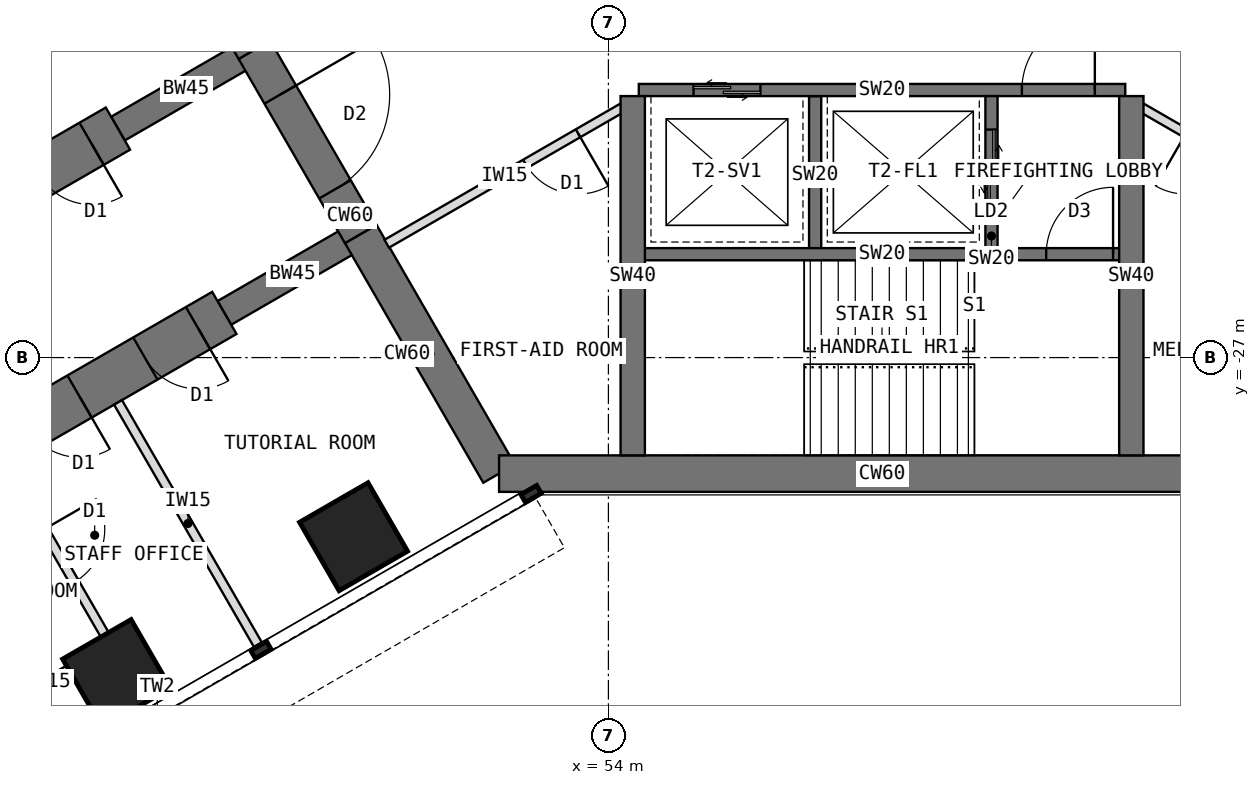
"""IFC4 building model, lengths in metres.
Left out: names, types, materials, properties, quantities, classifications, styles, units other than length and angle.
Written with IfcOpenShell. Run it as: python <this file> out.ifc"""

import sys

from ifc_helpers import new_model, si_unit, direction, frame, frame_2d, origin, origin_2d, place, context, subcontext, project, spatial, rectangle, extrude, element, fill, save


model = new_model("IFC4")
c1 = context("Model", 3, precision=1e-05, world=origin(), true_north=direction((0.0, 1.0)))
c2 = subcontext(c1, "Body", "Model", "MODEL_VIEW")
j1 = project(units=[si_unit("LENGTHUNIT", "METRE"), si_unit("PLANEANGLEUNIT", "RADIAN")], contexts=[c1])
p1 = place(None, origin())
s1 = spatial("IfcSite", under=j1, at=p1, CompositionType="ELEMENT")
p2 = place(p1, origin())
s2 = spatial("IfcBuilding", under=s1, at=p2, CompositionType="ELEMENT")
p3 = place(p2, frame((0.0, 0.0, 133.5)))
s3 = spatial("IfcBuildingStorey", under=s2, at=p3, CompositionType="ELEMENT", Elevation=133.5)
p4 = place(p3, frame((45.904, -18.0, 0.0), z_axis=(0.0, 0.0, 1.0), x_axis=(0.500024481964, -0.866011268655, 0.0)))
e1 = element("IfcWall", 1, at=p4, inside=s3, PredefinedType="SHEAR", context=c2, shape_type="SweptSolid", body=[
    extrude(rectangle(XDim=4.548, YDim=0.6, at=frame_2d((2.274, 0.0))), origin(), (0.0, 0.0, 1.0), 4.0),
])
p5 = place(p3, frame((48.178, -21.939, 0.0), z_axis=(0.0, 0.0, 1.0), x_axis=(0.500010275428, -0.866019471182, 0.0)))
e2 = element("IfcWall", 2, at=p5, inside=s3, PredefinedType="SHEAR", context=c2, shape_type="SweptSolid", body=[
    extrude(rectangle(XDim=3.5, YDim=0.6, at=frame_2d((1.75, 0.0))), origin(), (0.0, 0.0, 1.0), 4.0),
])
p6 = place(p5, frame((0.85, 0.0, 0.0)))
e3 = element("IfcOpeningElement", 3, at=p6, cuts=e2, PredefinedType="OPENING", context=c2, shape_type="SweptSolid", body=[
    extrude(rectangle(XDim=1.8, YDim=2.1, at=frame_2d((0.9, 1.05))), frame((0.0, 0.31, 0.0), z_axis=(0.0, -1.0, 0.0), x_axis=(1.0, 0.0, 0.0)), (0.0, 0.0, 1.0), 0.62),
])
p7 = place(p3, frame((49.928, -24.97, 0.0), z_axis=(0.0, 0.0, 1.0), x_axis=(0.499984222037, -0.866034513004, 0.0)))
e4 = element("IfcWall", 4, at=p7, inside=s3, PredefinedType="SHEAR", context=c2, shape_type="SweptSolid", body=[
    extrude(rectangle(XDim=4.548, YDim=0.6, at=frame_2d((2.274, 0.0))), origin(), (0.0, 0.0, 1.0), 4.0),
])
p8 = place(p3, frame((52.202, -28.908, 0.0), z_axis=(0.0, 0.0, 1.0), x_axis=(1.0, 0.0, 0.0)))
e5 = element("IfcWall", 5, at=p8, inside=s3, PredefinedType="SHEAR", context=c2, shape_type="SweptSolid", body=[
    extrude(rectangle(XDim=12.596, YDim=0.6, at=frame_2d((6.298, 0.0))), origin(), (0.0, 0.0, 1.0), 4.0),
])
p9 = place(p3, frame((49.928, -24.97, 0.0), z_axis=(0.0, 0.0, 1.0), x_axis=(-0.866031863473, -0.499988811324, 0.0)))
e6 = element("IfcWall", 6, at=p9, inside=s3, PredefinedType="SHEAR", context=c2, shape_type="SweptSolid", body=[
    extrude(rectangle(XDim=2.592, YDim=0.45, at=frame_2d((1.296, 0.0))), origin(), (0.0, 0.0, 1.0), 4.0),
])
p10 = place(p3, frame((47.684, -26.266, 0.0), z_axis=(0.0, 0.0, 1.0), x_axis=(-0.866027579429, -0.499996231654, 0.0)))
e7 = element("IfcWall", 7, at=p10, inside=s3, PredefinedType="SHEAR", context=c2, shape_type="SweptSolid", body=[
    extrude(rectangle(XDim=13.2, YDim=0.8, at=frame_2d((6.6, 0.0))), origin(), (0.0, 0.0, 1.0), 4.0),
])
p11 = place(p10, frame((0.5, 0.0, 0.0)))
e8 = element("IfcOpeningElement", 8, at=p11, cuts=e7, PredefinedType="OPENING", context=c2, shape_type="SweptSolid", body=[
    extrude(rectangle(XDim=1.0, YDim=2.1, at=frame_2d((0.5, 1.05))), frame((0.0, 0.41, 0.0), z_axis=(0.0, -1.0, 0.0), x_axis=(1.0, 0.0, 0.0)), (0.0, 0.0, 1.0), 0.82),
])
p12 = place(p10, frame((2.75, 0.0, 0.0)))
e9 = element("IfcOpeningElement", 9, at=p12, cuts=e7, PredefinedType="OPENING", context=c2, shape_type="SweptSolid", body=[
    extrude(rectangle(XDim=1.0, YDim=2.1, at=frame_2d((0.5, 1.05))), frame((0.0, 0.41, 0.0), z_axis=(0.0, -1.0, 0.0), x_axis=(1.0, 0.0, 0.0)), (0.0, 0.0, 1.0), 0.82),
])
p13 = place(p10, frame((7.25, 0.0, 0.0)))
e10 = element("IfcOpeningElement", 10, at=p13, cuts=e7, PredefinedType="OPENING", context=c2, shape_type="SweptSolid", body=[
    extrude(rectangle(XDim=1.0, YDim=2.1, at=frame_2d((0.5, 1.05))), frame((0.0, 0.41, 0.0), z_axis=(0.0, -1.0, 0.0), x_axis=(1.0, 0.0, 0.0)), (0.0, 0.0, 1.0), 0.82),
])
p14 = place(p3, frame((48.178, -21.939, 0.0), z_axis=(0.0, 0.0, 1.0), x_axis=(-0.866072649678, -0.499918158782, 0.0)))
e11 = element("IfcWall", 11, at=p14, inside=s3, PredefinedType="SHEAR", context=c2, shape_type="SweptSolid", body=[
    extrude(rectangle(XDim=2.592, YDim=0.45, at=frame_2d((1.296, 0.0))), origin(), (0.0, 0.0, 1.0), 4.0),
])
p15 = place(p3, frame((45.934, -23.234, 0.0), z_axis=(0.0, 0.0, 1.0), x_axis=(-0.866019570528, -0.500010103361, 0.0)))
e12 = element("IfcWall", 12, at=p15, inside=s3, PredefinedType="SHEAR", context=c2, shape_type="SweptSolid", body=[
    extrude(rectangle(XDim=13.2, YDim=0.8, at=frame_2d((6.6, 0.0))), origin(), (0.0, 0.0, 1.0), 4.0),
])
p16 = place(p15, frame((0.5, 0.0, 0.0)))
e13 = element("IfcOpeningElement", 13, at=p16, cuts=e12, PredefinedType="OPENING", context=c2, shape_type="SweptSolid", body=[
    extrude(rectangle(XDim=1.0, YDim=2.1, at=frame_2d((0.5, 1.05))), frame((0.0, 0.41, 0.0), z_axis=(0.0, -1.0, 0.0), x_axis=(1.0, 0.0, 0.0)), (0.0, 0.0, 1.0), 0.82),
])
p17 = place(p15, frame((2.75, 0.0, 0.0)))
e14 = element("IfcOpeningElement", 14, at=p17, cuts=e12, PredefinedType="OPENING", context=c2, shape_type="SweptSolid", body=[
    extrude(rectangle(XDim=1.0, YDim=2.1, at=frame_2d((0.5, 1.05))), frame((0.0, 0.41, 0.0), z_axis=(0.0, -1.0, 0.0), x_axis=(1.0, 0.0, 0.0)), (0.0, 0.0, 1.0), 0.82),
])
p18 = place(p15, frame((7.25, 0.0, 0.0)))
e15 = element("IfcOpeningElement", 15, at=p18, cuts=e12, PredefinedType="OPENING", context=c2, shape_type="SweptSolid", body=[
    extrude(rectangle(XDim=1.0, YDim=2.1, at=frame_2d((0.5, 1.05))), frame((0.0, 0.41, 0.0), z_axis=(0.0, -1.0, 0.0), x_axis=(1.0, 0.0, 0.0)), (0.0, 0.0, 1.0), 0.82),
])
for number, where, z_axis, x_axis in (
    (16, (49.809, -29.946, 0.0), (0.0, 0.0, 1.0), (0.866, 0.5, 0.0)),
    (17, (45.912, -32.196, 0.0), (0.0, 0.0, 1.0), (0.866, 0.5, 0.0)),
):
    element("IfcColumn", number, at=place(p3, frame(where, z_axis=z_axis, x_axis=x_axis)), inside=s3, PredefinedType="COLUMN", context=c2, shape_type="SweptSolid", body=[
        extrude(rectangle(XDim=1.3, YDim=1.3, at=origin_2d()), origin(), (0.0, 0.0, 1.0), 4.0),
    ])
p19 = place(p3, frame((54.5, -22.6, 0.0), z_axis=(0.0, 0.0, 1.0), x_axis=(1.0, 0.0, 0.0)))
e18 = element("IfcWall", 18, at=p19, inside=s3, PredefinedType="SHEAR", context=c2, shape_type="SweptSolid", body=[
    extrude(rectangle(XDim=8.0, YDim=0.2, at=frame_2d((4.0, 0.0))), origin(), (0.0, 0.0, 1.0), 4.0),
])
p20 = place(p19, frame((6.3, 0.0, 0.0)))
e19 = element("IfcOpeningElement", 19, at=p20, cuts=e18, PredefinedType="OPENING", context=c2, shape_type="SweptSolid", body=[
    extrude(rectangle(XDim=1.2, YDim=2.1, at=frame_2d((0.6, 1.05))), frame((0.0, 0.11, 0.0), z_axis=(0.0, -1.0, 0.0), x_axis=(1.0, 0.0, 0.0)), (0.0, 0.0, 1.0), 0.22),
])
p21 = place(p19, frame((0.9, 0.0, 0.0)))
e20 = element("IfcOpeningElement", 20, at=p21, cuts=e18, PredefinedType="OPENING", context=c2, shape_type="SweptSolid", body=[
    extrude(rectangle(XDim=1.1, YDim=2.2, at=frame_2d((0.55, 1.1))), frame((0.0, 0.11, 0.0), z_axis=(0.0, -1.0, 0.0), x_axis=(1.0, 0.0, 0.0)), (0.0, 0.0, 1.0), 0.22),
])
p22 = place(p3, frame((57.4, -22.7, 0.0), z_axis=(0.0, 0.0, 1.0), x_axis=(0.0, -1.0, 0.0)))
e21 = element("IfcWall", 21, at=p22, inside=s3, PredefinedType="SHEAR", context=c2, shape_type="SweptSolid", body=[
    extrude(rectangle(XDim=2.6, YDim=0.2, at=frame_2d((1.3, 0.0))), origin(), (0.0, 0.0, 1.0), 4.0),
])
p23 = place(p3, frame((60.3, -22.7, 0.0), z_axis=(0.0, 0.0, 1.0), x_axis=(0.0, -1.0, 0.0)))
e22 = element("IfcWall", 22, at=p23, inside=s3, PredefinedType="SHEAR", context=c2, shape_type="SweptSolid", body=[
    extrude(rectangle(XDim=2.6, YDim=0.2, at=frame_2d((1.3, 0.0))), origin(), (0.0, 0.0, 1.0), 4.0),
])
p24 = place(p23, frame((0.55, 0.0, 0.0)))
e23 = element("IfcOpeningElement", 23, at=p24, cuts=e22, PredefinedType="OPENING", context=c2, shape_type="SweptSolid", body=[
    extrude(rectangle(XDim=1.3, YDim=2.2, at=frame_2d((0.65, 1.1))), frame((0.0, 0.11, 0.0), z_axis=(0.0, -1.0, 0.0), x_axis=(1.0, 0.0, 0.0)), (0.0, 0.0, 1.0), 0.22),
])
p25 = place(p3, frame((54.5, -25.3, 0.0), z_axis=(0.0, 0.0, 1.0), x_axis=(1.0, 0.0, 0.0)))
e24 = element("IfcWall", 24, at=p25, inside=s3, PredefinedType="SHEAR", context=c2, shape_type="SweptSolid", body=[
    extrude(rectangle(XDim=8.0, YDim=0.2, at=frame_2d((4.0, 0.0))), origin(), (0.0, 0.0, 1.0), 4.0),
])
p26 = place(p25, frame((6.7, 0.0, 0.0)))
e25 = element("IfcOpeningElement", 25, at=p26, cuts=e24, PredefinedType="OPENING", context=c2, shape_type="SweptSolid", body=[
    extrude(rectangle(XDim=1.1, YDim=2.1, at=frame_2d((0.55, 1.05))), frame((0.0, 0.11, 0.0), z_axis=(0.0, -1.0, 0.0), x_axis=(1.0, 0.0, 0.0)), (0.0, 0.0, 1.0), 0.22),
])
for number, where, z_axis, x_axis in (
    (26, (62.6, -22.7, 0.0), (0.0, 0.0, 1.0), (0.0, -1.0, 0.0)),
    (27, (54.4, -22.7, 0.0), (0.0, 0.0, 1.0), (0.0, -1.0, 0.0)),
):
    element("IfcWall", number, at=place(p3, frame(where, z_axis=z_axis, x_axis=x_axis)), inside=s3, PredefinedType="SHEAR", context=c2, shape_type="SweptSolid", body=[
        extrude(rectangle(XDim=5.908, YDim=0.4, at=frame_2d((2.954, 0.0))), origin(), (0.0, 0.0, 1.0), 4.0),
    ])
p27 = place(p3, frame((45.935, -27.737, 0.0), z_axis=(0.0, 0.0, 1.0), x_axis=(0.500014953309, -0.866016770315, 0.0)))
e28 = element("IfcWall", 28, at=p27, inside=s3, PredefinedType="PARTITIONING", context=c2, shape_type="SweptSolid", body=[
    extrude(rectangle(XDim=4.6, YDim=0.15, at=frame_2d((2.3, 0.0))), origin(), (0.0, 0.0, 1.0), 3.8),
])
p28 = place(p3, frame((45.816, -31.731, 0.0), z_axis=(0.0, 0.0, 1.0), x_axis=(-0.866024647952, -0.500001309137, 0.0)))
e29 = element("IfcWall", 29, at=p28, inside=s3, PredefinedType="PARTITIONING", context=c2, shape_type="SweptSolid", body=[
    extrude(rectangle(XDim=2.4, YDim=0.15, at=frame_2d((1.2, 0.0))), origin(), (0.0, 0.0, 1.0), 3.8),
])
p29 = place(p3, frame((44.116, -28.787, 0.0), z_axis=(0.0, 0.0, 1.0), x_axis=(0.499977295307, -0.866038511948, 0.0)))
e30 = element("IfcWall", 30, at=p29, inside=s3, PredefinedType="PARTITIONING", context=c2, shape_type="SweptSolid", body=[
    extrude(rectangle(XDim=3.4, YDim=0.15, at=frame_2d((1.7, 0.0))), origin(), (0.0, 0.0, 1.0), 3.8),
])
p30 = place(p29, frame((1.2, 0.0, 0.0)))
e31 = element("IfcOpeningElement", 31, at=p30, cuts=e30, PredefinedType="OPENING", context=c2, shape_type="SweptSolid", body=[
    extrude(rectangle(XDim=1.0, YDim=2.1, at=frame_2d((0.5, 1.05))), frame((0.0, 0.085, 0.0), z_axis=(0.0, -1.0, 0.0), x_axis=(1.0, 0.0, 0.0)), (0.0, 0.0, 1.0), 0.17),
])
p31 = place(p3, frame((66.646, -25.128, 0.0), z_axis=(0.0, 0.0, 1.0), x_axis=(-0.866025707867, 0.499999473313, 0.0)))
e32 = element("IfcWall", 32, at=p31, inside=s3, PredefinedType="PARTITIONING", context=c2, shape_type="SweptSolid", body=[
    extrude(rectangle(XDim=4.476, YDim=0.15, at=frame_2d((2.238, 0.0))), origin(), (0.0, 0.0, 1.0), 3.8),
])
p32 = place(p31, frame((2.633, 0.0, 0.0)))
e33 = element("IfcOpeningElement", 33, at=p32, cuts=e32, PredefinedType="OPENING", context=c2, shape_type="SweptSolid", body=[
    extrude(rectangle(XDim=1.0, YDim=2.1, at=frame_2d((0.5, 1.05))), frame((0.0, 0.085, 0.0), z_axis=(0.0, -1.0, 0.0), x_axis=(1.0, 0.0, 0.0)), (0.0, 0.0, 1.0), 0.17),
])
p33 = place(p3, frame((54.23, -22.89, 0.0), z_axis=(0.0, 0.0, 1.0), x_axis=(-0.866025707867, -0.499999473313, 0.0)))
e34 = element("IfcWall", 34, at=p33, inside=s3, PredefinedType="PARTITIONING", context=c2, shape_type="SweptSolid", body=[
    extrude(rectangle(XDim=4.476, YDim=0.15, at=frame_2d((2.238, 0.0))), origin(), (0.0, 0.0, 1.0), 3.8),
])
p34 = place(p33, frame((0.843, 0.0, 0.0)))
e35 = element("IfcOpeningElement", 35, at=p34, cuts=e34, PredefinedType="OPENING", context=c2, shape_type="SweptSolid", body=[
    extrude(rectangle(XDim=1.0, YDim=2.1, at=frame_2d((0.5, 1.05))), frame((0.0, 0.085, 0.0), z_axis=(0.0, -1.0, 0.0), x_axis=(1.0, 0.0, 0.0)), (0.0, 0.0, 1.0), 0.17),
])
p35 = place(p20, origin())
e36 = element("IfcDoor", 36, at=p35, inside=s3, OperationType="SINGLE_SWING_RIGHT", PredefinedType="DOOR", context=c2, shape_type="SweptSolid", body=[
    extrude(rectangle(XDim=1.2, YDim=2.1, at=frame_2d((0.6, 1.05))), frame((0.0, 0.025, 0.0), z_axis=(0.0, -1.0, 0.0), x_axis=(1.0, 0.0, 0.0)), (0.0, 0.0, 1.0), 0.05),
])
fill(e19, e36)
p36 = place(p24, origin())
e37 = element("IfcDoor", 37, at=p36, inside=s3, OperationType="DOUBLE_DOOR_SLIDING", PredefinedType="DOOR", context=c2, shape_type="SweptSolid", body=[
    extrude(rectangle(XDim=1.3, YDim=2.2, at=frame_2d((0.65, 1.1))), frame((0.0, 0.025, 0.0), z_axis=(0.0, -1.0, 0.0), x_axis=(1.0, 0.0, 0.0)), (0.0, 0.0, 1.0), 0.05),
])
fill(e23, e37)
p37 = place(p21, origin())
e38 = element("IfcDoor", 38, at=p37, inside=s3, OperationType="DOUBLE_DOOR_SLIDING", PredefinedType="DOOR", context=c2, shape_type="SweptSolid", body=[
    extrude(rectangle(XDim=1.1, YDim=2.2, at=frame_2d((0.55, 1.1))), frame((0.0, 0.025, 0.0), z_axis=(0.0, -1.0, 0.0), x_axis=(1.0, 0.0, 0.0)), (0.0, 0.0, 1.0), 0.05),
])
fill(e20, e38)
p38 = place(p26, origin())
e39 = element("IfcDoor", 39, at=p38, inside=s3, OperationType="SINGLE_SWING_RIGHT", PredefinedType="DOOR", context=c2, shape_type="SweptSolid", body=[
    extrude(rectangle(XDim=1.1, YDim=2.1, at=frame_2d((0.55, 1.05))), frame((0.0, 0.025, 0.0), z_axis=(0.0, -1.0, 0.0), x_axis=(1.0, 0.0, 0.0)), (0.0, 0.0, 1.0), 0.05),
])
fill(e25, e39)
p39 = place(p6, origin())
e40 = element("IfcDoor", 40, at=p39, inside=s3, OperationType="DOUBLE_DOOR_DOUBLE_SWING", PredefinedType="DOOR", context=c2, shape_type="SweptSolid", body=[
    extrude(rectangle(XDim=1.72, YDim=2.06, at=frame_2d((0.9, 1.03))), frame((0.0, 0.025, 0.0), z_axis=(0.0, -1.0, 0.0), x_axis=(1.0, 0.0, 0.0)), (0.0, 0.0, 1.0), 0.05),
    extrude(rectangle(XDim=0.04, YDim=2.1, at=frame_2d((0.02, 1.05))), frame((0.0, 0.3, 0.0), z_axis=(0.0, -1.0, 0.0), x_axis=(1.0, 0.0, 0.0)), (0.0, 0.0, 1.0), 0.6),
    extrude(rectangle(XDim=0.04, YDim=2.1, at=frame_2d((1.78, 1.05))), frame((0.0, 0.3, 0.0), z_axis=(0.0, -1.0, 0.0), x_axis=(1.0, 0.0, 0.0)), (0.0, 0.0, 1.0), 0.6),
    extrude(rectangle(XDim=1.72, YDim=0.04, at=frame_2d((0.9, 2.08))), frame((0.0, 0.3, 0.0), z_axis=(0.0, -1.0, 0.0), x_axis=(1.0, 0.0, 0.0)), (0.0, 0.0, 1.0), 0.6),
])
fill(e3, e40)
p40 = place(p30, origin())
e41 = element("IfcDoor", 41, at=p40, inside=s3, OperationType="SINGLE_SWING_LEFT", PredefinedType="DOOR", context=c2, shape_type="SweptSolid", body=[
    extrude(rectangle(XDim=1.0, YDim=2.1, at=frame_2d((0.5, 1.05))), frame((0.0, 0.025, 0.0), z_axis=(0.0, -1.0, 0.0), x_axis=(1.0, 0.0, 0.0)), (0.0, 0.0, 1.0), 0.05),
])
fill(e31, e41)
p41 = place(p34, origin())
e42 = element("IfcDoor", 42, at=p41, inside=s3, OperationType="SINGLE_SWING_LEFT", PredefinedType="DOOR", context=c2, shape_type="SweptSolid", body=[
    extrude(rectangle(XDim=1.0, YDim=2.1, at=frame_2d((0.5, 1.05))), frame((0.0, 0.025, 0.0), z_axis=(0.0, -1.0, 0.0), x_axis=(1.0, 0.0, 0.0)), (0.0, 0.0, 1.0), 0.05),
])
fill(e35, e42)
p42 = place(p11, origin())
e43 = element("IfcDoor", 43, at=p42, inside=s3, OperationType="SINGLE_SWING_LEFT", PredefinedType="DOOR", context=c2, shape_type="SweptSolid", body=[
    extrude(rectangle(XDim=0.92, YDim=2.06, at=frame_2d((0.5, 1.03))), frame((0.0, 0.025, 0.0), z_axis=(0.0, -1.0, 0.0), x_axis=(1.0, 0.0, 0.0)), (0.0, 0.0, 1.0), 0.05),
    extrude(rectangle(XDim=0.04, YDim=2.1, at=frame_2d((0.02, 1.05))), frame((0.0, 0.4, 0.0), z_axis=(0.0, -1.0, 0.0), x_axis=(1.0, 0.0, 0.0)), (0.0, 0.0, 1.0), 0.8),
    extrude(rectangle(XDim=0.04, YDim=2.1, at=frame_2d((0.98, 1.05))), frame((0.0, 0.4, 0.0), z_axis=(0.0, -1.0, 0.0), x_axis=(1.0, 0.0, 0.0)), (0.0, 0.0, 1.0), 0.8),
    extrude(rectangle(XDim=0.92, YDim=0.04, at=frame_2d((0.5, 2.08))), frame((0.0, 0.4, 0.0), z_axis=(0.0, -1.0, 0.0), x_axis=(1.0, 0.0, 0.0)), (0.0, 0.0, 1.0), 0.8),
])
fill(e8, e43)
p43 = place(p12, origin())
e44 = element("IfcDoor", 44, at=p43, inside=s3, OperationType="SINGLE_SWING_LEFT", PredefinedType="DOOR", context=c2, shape_type="SweptSolid", body=[
    extrude(rectangle(XDim=0.92, YDim=2.06, at=frame_2d((0.5, 1.03))), frame((0.0, 0.025, 0.0), z_axis=(0.0, -1.0, 0.0), x_axis=(1.0, 0.0, 0.0)), (0.0, 0.0, 1.0), 0.05),
    extrude(rectangle(XDim=0.04, YDim=2.1, at=frame_2d((0.02, 1.05))), frame((0.0, 0.4, 0.0), z_axis=(0.0, -1.0, 0.0), x_axis=(1.0, 0.0, 0.0)), (0.0, 0.0, 1.0), 0.8),
    extrude(rectangle(XDim=0.04, YDim=2.1, at=frame_2d((0.98, 1.05))), frame((0.0, 0.4, 0.0), z_axis=(0.0, -1.0, 0.0), x_axis=(1.0, 0.0, 0.0)), (0.0, 0.0, 1.0), 0.8),
    extrude(rectangle(XDim=0.92, YDim=0.04, at=frame_2d((0.5, 2.08))), frame((0.0, 0.4, 0.0), z_axis=(0.0, -1.0, 0.0), x_axis=(1.0, 0.0, 0.0)), (0.0, 0.0, 1.0), 0.8),
])
fill(e9, e44)
p44 = place(p16, origin())
e45 = element("IfcDoor", 45, at=p44, inside=s3, OperationType="SINGLE_SWING_LEFT", PredefinedType="DOOR", context=c2, shape_type="SweptSolid", body=[
    extrude(rectangle(XDim=0.92, YDim=2.06, at=frame_2d((0.5, 1.03))), frame((0.0, 0.025, 0.0), z_axis=(0.0, -1.0, 0.0), x_axis=(1.0, 0.0, 0.0)), (0.0, 0.0, 1.0), 0.05),
    extrude(rectangle(XDim=0.04, YDim=2.1, at=frame_2d((0.02, 1.05))), frame((0.0, 0.4, 0.0), z_axis=(0.0, -1.0, 0.0), x_axis=(1.0, 0.0, 0.0)), (0.0, 0.0, 1.0), 0.8),
    extrude(rectangle(XDim=0.04, YDim=2.1, at=frame_2d((0.98, 1.05))), frame((0.0, 0.4, 0.0), z_axis=(0.0, -1.0, 0.0), x_axis=(1.0, 0.0, 0.0)), (0.0, 0.0, 1.0), 0.8),
    extrude(rectangle(XDim=0.92, YDim=0.04, at=frame_2d((0.5, 2.08))), frame((0.0, 0.4, 0.0), z_axis=(0.0, -1.0, 0.0), x_axis=(1.0, 0.0, 0.0)), (0.0, 0.0, 1.0), 0.8),
])
fill(e13, e45)
save(model, sys.argv[1])
